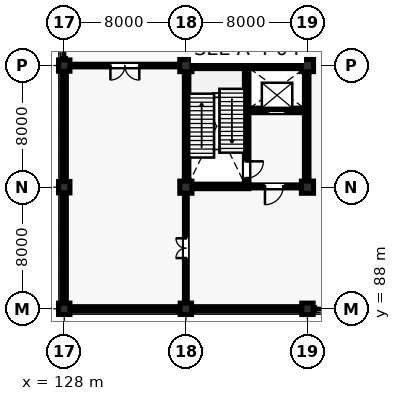
"""IFC4 building model, lengths in metres.
Left out: names, types, materials, properties, quantities, classifications, styles, units other than length and angle.
Written with IfcOpenShell. Run it as: python <this file> out.ifc"""

import sys

from ifc_helpers import new_model, si_unit, direction, frame, frame_2d, origin, origin_2d, place, context, subcontext, project, spatial, rectangle, extrude, element, fill, save


model = new_model("IFC4")
c1 = context("Model", 3, precision=1e-05, world=origin(), true_north=direction((0.0, 1.0)))
c2 = subcontext(c1, "Body", "Model", "MODEL_VIEW")
j1 = project(units=[si_unit("LENGTHUNIT", "METRE"), si_unit("PLANEANGLEUNIT", "RADIAN")], contexts=[c1])
p1 = place(None, origin())
s1 = spatial("IfcSite", under=j1, at=p1, CompositionType="ELEMENT")
p2 = place(p1, origin())
s2 = spatial("IfcBuilding", under=s1, at=p2, CompositionType="ELEMENT")
p3 = place(p2, origin())
s3 = spatial("IfcBuildingStorey", under=s2, at=p3, CompositionType="ELEMENT", Elevation=0.0)
for number, where, z_axis, x_axis in (
    (1, (128.0, 88.0, 0.0), (0.0, 0.0, 1.0), (1.0, 0.0, 0.0)),
    (2, (128.0, 96.0, 0.0), (0.0, 0.0, 1.0), (1.0, 0.0, 0.0)),
    (3, (128.0, 104.0, 0.0), (0.0, 0.0, 1.0), (1.0, 0.0, 0.0)),
    (4, (136.0, 88.0, 0.0), (0.0, 0.0, 1.0), (1.0, 0.0, 0.0)),
):
    element("IfcColumn", number, at=place(p3, frame(where, z_axis=z_axis, x_axis=x_axis)), inside=s3, PredefinedType="COLUMN", context=c2, shape_type="SweptSolid", body=[
        extrude(rectangle(XDim=0.75, YDim=0.75, at=origin_2d()), origin(), (0.0, 0.0, 1.0), 5.28),
    ])
for number, where, z_axis, x_axis in (
    (5, (136.0, 96.0, 0.0), (0.0, 0.0, 1.0), (1.0, 0.0, 0.0)),
    (6, (136.0, 104.0, 0.0), (0.0, 0.0, 1.0), (1.0, 0.0, 0.0)),
):
    element("IfcColumn", number, at=place(p3, frame(where, z_axis=z_axis, x_axis=x_axis)), inside=s3, PredefinedType="COLUMN", context=c2, shape_type="SweptSolid", body=[
        extrude(rectangle(XDim=0.8, YDim=0.8, at=origin_2d()), origin(), (0.0, 0.0, 1.0), 5.28),
    ])
p4 = place(p3, frame((144.0, 88.0, 0.0), z_axis=(0.0, 0.0, 1.0), x_axis=(1.0, 0.0, 0.0)))
e7 = element("IfcColumn", 7, at=p4, inside=s3, PredefinedType="COLUMN", context=c2, shape_type="SweptSolid", body=[
    extrude(rectangle(XDim=0.75, YDim=0.75, at=origin_2d()), origin(), (0.0, 0.0, 1.0), 5.28),
])
for number, where, z_axis, x_axis in (
    (8, (144.0, 96.0, 0.0), (0.0, 0.0, 1.0), (1.0, 0.0, 0.0)),
    (9, (144.0, 104.0, 0.0), (0.0, 0.0, 1.0), (1.0, 0.0, 0.0)),
):
    element("IfcColumn", number, at=place(p3, frame(where, z_axis=z_axis, x_axis=x_axis)), inside=s3, PredefinedType="COLUMN", context=c2, shape_type="SweptSolid", body=[
        extrude(rectangle(XDim=0.8, YDim=0.8, at=origin_2d()), origin(), (0.0, 0.0, 1.0), 5.28),
    ])
p5 = place(p3, frame((128.36, 88.0, 0.0), z_axis=(0.0, 0.0, 1.0), x_axis=(1.0, 0.0, 0.0)))
e10 = element("IfcWall", 10, at=p5, inside=s3, PredefinedType="SOLIDWALL", context=c2, shape_type="SweptSolid", body=[
    extrude(rectangle(XDim=7.28, YDim=0.28, at=frame_2d((3.64, 0.0))), origin(), (0.0, 0.0, 1.0), 4.677),
])
p6 = place(p5, frame((2.49, 0.0, 0.9)))
e11 = element("IfcOpeningElement", 11, at=p6, cuts=e10, PredefinedType="OPENING", context=c2, shape_type="SweptSolid", body=[
    extrude(rectangle(XDim=2.3, YDim=2.55, at=frame_2d((1.15, 1.275))), frame((0.0, 0.15, 0.0), z_axis=(0.0, -1.0, 0.0), x_axis=(1.0, 0.0, 0.0)), (0.0, 0.0, 1.0), 0.3),
])
p7 = place(p3, frame((128.0, 88.36, 0.0), z_axis=(0.0, 0.0, 1.0), x_axis=(0.0, 1.0, 0.0)))
e12 = element("IfcWall", 12, at=p7, inside=s3, PredefinedType="SOLIDWALL", context=c2, shape_type="SweptSolid", body=[
    extrude(rectangle(XDim=7.28, YDim=0.28, at=frame_2d((3.64, 0.0))), origin(), (0.0, 0.0, 1.0), 4.677),
])
p8 = place(p7, frame((2.49, 0.0, 0.9)))
e13 = element("IfcOpeningElement", 13, at=p8, cuts=e12, PredefinedType="OPENING", context=c2, shape_type="SweptSolid", body=[
    extrude(rectangle(XDim=2.3, YDim=2.55, at=frame_2d((1.15, 1.275))), frame((0.0, 0.15, 0.0), z_axis=(0.0, -1.0, 0.0), x_axis=(1.0, 0.0, 0.0)), (0.0, 0.0, 1.0), 0.3),
])
p9 = place(p3, frame((128.0, 96.36, 0.0), z_axis=(0.0, 0.0, 1.0), x_axis=(0.0, 1.0, 0.0)))
e14 = element("IfcWall", 14, at=p9, inside=s3, PredefinedType="SOLIDWALL", context=c2, shape_type="SweptSolid", body=[
    extrude(rectangle(XDim=7.28, YDim=0.28, at=frame_2d((3.64, 0.0))), origin(), (0.0, 0.0, 1.0), 4.61),
])
p10 = place(p9, frame((2.44, 0.0, 0.9)))
e15 = element("IfcOpeningElement", 15, at=p10, cuts=e14, PredefinedType="OPENING", context=c2, shape_type="SweptSolid", body=[
    extrude(rectangle(XDim=2.4, YDim=2.8, at=frame_2d((1.2, 1.4))), frame((0.0, 0.15, 0.0), z_axis=(0.0, -1.0, 0.0), x_axis=(1.0, 0.0, 0.0)), (0.0, 0.0, 1.0), 0.3),
])
p11 = place(p3, frame((136.36, 88.0, 0.0), z_axis=(0.0, 0.0, 1.0), x_axis=(1.0, 0.0, 0.0)))
e16 = element("IfcWall", 16, at=p11, inside=s3, PredefinedType="SOLIDWALL", context=c2, shape_type="SweptSolid", body=[
    extrude(rectangle(XDim=7.28, YDim=0.28, at=frame_2d((3.64, 0.0))), origin(), (0.0, 0.0, 1.0), 4.61),
])
p12 = place(p11, frame((2.44, 0.0, 0.9)))
e17 = element("IfcOpeningElement", 17, at=p12, cuts=e16, PredefinedType="OPENING", context=c2, shape_type="SweptSolid", body=[
    extrude(rectangle(XDim=2.4, YDim=2.8, at=frame_2d((1.2, 1.4))), frame((0.0, 0.15, 0.0), z_axis=(0.0, -1.0, 0.0), x_axis=(1.0, 0.0, 0.0)), (0.0, 0.0, 1.0), 0.3),
])
for number, where, z_axis, x_axis in (
    (18, (136.05, 96.29, 0.0), (0.0, 0.0, 1.0), (0.0, 1.0, 0.0)),
    (19, (136.29, 103.95, 0.0), (0.0, 0.0, 1.0), (1.0, 0.0, 0.0)),
    (20, (143.95, 96.29, 0.0), (0.0, 0.0, 1.0), (0.0, 1.0, 0.0)),
):
    element("IfcWall", number, at=place(p3, frame(where, z_axis=z_axis, x_axis=x_axis)), inside=s3, PredefinedType="SHEAR", context=c2, shape_type="SweptSolid", body=[
        extrude(rectangle(XDim=7.42, YDim=0.3, at=frame_2d((3.71, 0.0))), origin(), (0.0, 0.0, 1.0), 5.035),
    ])
p13 = place(p3, frame((136.29, 96.05, 0.0), z_axis=(0.0, 0.0, 1.0), x_axis=(1.0, 0.0, 0.0)))
e21 = element("IfcWall", 21, at=p13, inside=s3, PredefinedType="SHEAR", context=c2, shape_type="SweptSolid", body=[
    extrude(rectangle(XDim=3.86, YDim=0.3, at=frame_2d((1.93, 0.0))), origin(), (0.0, 0.0, 1.0), 5.035),
])
p14 = place(p3, frame((140.0, 96.05, 0.0), z_axis=(0.0, 0.0, 1.0), x_axis=(0.0, 1.0, 0.0)))
e22 = element("IfcWall", 22, at=p14, inside=s3, PredefinedType="SHEAR", context=c2, shape_type="SweptSolid", body=[
    extrude(rectangle(XDim=7.9, YDim=0.3, at=frame_2d((3.95, 0.0))), origin(), (0.0, 0.0, 1.0), 5.035),
])
p15 = place(p14, frame((0.55, 0.0, 0.0)))
e23 = element("IfcOpeningElement", 23, at=p15, cuts=e22, PredefinedType="OPENING", context=c2, shape_type="SweptSolid", body=[
    extrude(rectangle(XDim=1.1, YDim=2.15, at=frame_2d((0.55, 1.075))), frame((0.0, 0.16, 0.0), z_axis=(0.0, -1.0, 0.0), x_axis=(1.0, 0.0, 0.0)), (0.0, 0.0, 1.0), 0.32),
])
p16 = place(p3, frame((140.0, 101.05, 0.0), z_axis=(0.0, 0.0, 1.0), x_axis=(1.0, 0.0, 0.0)))
e24 = element("IfcWall", 24, at=p16, inside=s3, PredefinedType="SHEAR", context=c2, shape_type="SweptSolid", body=[
    extrude(rectangle(XDim=3.95, YDim=0.3, at=frame_2d((1.975, 0.0))), origin(), (0.0, 0.0, 1.0), 5.035),
])
p17 = place(p16, frame((1.425, 0.0, 0.0)))
e25 = element("IfcOpeningElement", 25, at=p17, cuts=e24, PredefinedType="OPENING", context=c2, shape_type="SweptSolid", body=[
    extrude(rectangle(XDim=1.1, YDim=2.2, at=frame_2d((0.55, 1.1))), frame((0.0, 0.16, 0.0), z_axis=(0.0, -1.0, 0.0), x_axis=(1.0, 0.0, 0.0)), (0.0, 0.0, 1.0), 0.32),
])
p18 = place(p3, frame((140.0, 96.05, 0.0), z_axis=(0.0, 0.0, 1.0), x_axis=(1.0, 0.0, 0.0)))
e26 = element("IfcWall", 26, at=p18, inside=s3, PredefinedType="PARTITIONING", context=c2, shape_type="SweptSolid", body=[
    extrude(rectangle(XDim=3.61, YDim=0.2, at=frame_2d((1.805, 0.0))), origin(), (0.0, 0.0, 1.0), 4.403),
])
p19 = place(p18, frame((1.205, 0.0, 0.0)))
e27 = element("IfcOpeningElement", 27, at=p19, cuts=e26, PredefinedType="OPENING", context=c2, shape_type="SweptSolid", body=[
    extrude(rectangle(XDim=1.2, YDim=2.15, at=frame_2d((0.6, 1.075))), frame((0.0, 0.11, 0.0), z_axis=(0.0, -1.0, 0.0), x_axis=(1.0, 0.0, 0.0)), (0.0, 0.0, 1.0), 0.22),
])
p20 = place(p3, frame((136.0, 88.365, 0.0), z_axis=(0.0, 0.0, 1.0), x_axis=(0.0, 1.0, 0.0)))
e28 = element("IfcWall", 28, at=p20, inside=s3, PredefinedType="PARTITIONING", context=c2, shape_type="SweptSolid", body=[
    extrude(rectangle(XDim=7.245, YDim=0.185, at=frame_2d((3.623, 0.0))), origin(), (0.0, 0.0, 1.0), 4.403),
])
p21 = place(p20, frame((2.972, 0.0, 0.0)))
e29 = element("IfcOpeningElement", 29, at=p21, cuts=e28, PredefinedType="OPENING", context=c2, shape_type="SweptSolid", body=[
    extrude(rectangle(XDim=1.3, YDim=2.2, at=frame_2d((0.65, 1.1))), frame((0.0, 0.103, 0.0), z_axis=(0.0, -1.0, 0.0), x_axis=(1.0, 0.0, 0.0)), (0.0, 0.0, 1.0), 0.205),
])
p22 = place(p3, frame((128.365, 104.0, 0.0), z_axis=(0.0, 0.0, 1.0), x_axis=(1.0, 0.0, 0.0)))
e30 = element("IfcWall", 30, at=p22, inside=s3, PredefinedType="PARTITIONING", context=c2, shape_type="SweptSolid", body=[
    extrude(rectangle(XDim=7.245, YDim=0.175, at=frame_2d((3.623, 0.0))), origin(), (0.0, 0.0, 1.0), 4.403),
])
p23 = place(p22, frame((2.673, 0.0, 0.0)))
e31 = element("IfcOpeningElement", 31, at=p23, cuts=e30, PredefinedType="OPENING", context=c2, shape_type="SweptSolid", body=[
    extrude(rectangle(XDim=1.9, YDim=2.38, at=frame_2d((0.95, 1.19))), frame((0.0, 0.097, 0.0), z_axis=(0.0, -1.0, 0.0), x_axis=(1.0, 0.0, 0.0)), (0.0, 0.0, 1.0), 0.195),
])
p24 = place(p6, origin())
e32 = element("IfcWindow", 32, at=p24, inside=s3, PartitioningType="SINGLE_PANEL", PredefinedType="WINDOW", context=c2, shape_type="SweptSolid", body=[
    extrude(rectangle(XDim=2.3, YDim=2.55, at=frame_2d((1.15, 1.275))), frame((0.0, 0.03, 0.0), z_axis=(0.0, -1.0, 0.0), x_axis=(1.0, 0.0, 0.0)), (0.0, 0.0, 1.0), 0.06),
])
fill(e11, e32)
p25 = place(p8, origin())
e33 = element("IfcWindow", 33, at=p25, inside=s3, PartitioningType="SINGLE_PANEL", PredefinedType="WINDOW", context=c2, shape_type="SweptSolid", body=[
    extrude(rectangle(XDim=2.3, YDim=2.55, at=frame_2d((1.15, 1.275))), frame((0.0, 0.03, 0.0), z_axis=(0.0, -1.0, 0.0), x_axis=(1.0, 0.0, 0.0)), (0.0, 0.0, 1.0), 0.06),
])
fill(e13, e33)
p26 = place(p10, origin())
e34 = element("IfcWindow", 34, at=p26, inside=s3, PartitioningType="SINGLE_PANEL", PredefinedType="WINDOW", context=c2, shape_type="SweptSolid", body=[
    extrude(rectangle(XDim=2.4, YDim=2.8, at=frame_2d((1.2, 1.4))), frame((0.0, 0.03, 0.0), z_axis=(0.0, -1.0, 0.0), x_axis=(1.0, 0.0, 0.0)), (0.0, 0.0, 1.0), 0.06),
])
fill(e15, e34)
p27 = place(p12, origin())
e35 = element("IfcWindow", 35, at=p27, inside=s3, PartitioningType="SINGLE_PANEL", PredefinedType="WINDOW", context=c2, shape_type="SweptSolid", body=[
    extrude(rectangle(XDim=2.4, YDim=2.8, at=frame_2d((1.2, 1.4))), frame((0.0, 0.03, 0.0), z_axis=(0.0, -1.0, 0.0), x_axis=(1.0, 0.0, 0.0)), (0.0, 0.0, 1.0), 0.06),
])
fill(e17, e35)
p28 = place(p15, frame((1.1, 0.0, 0.0), z_axis=(0.0, 0.0, 1.0), x_axis=(-1.0, 0.0, 0.0)))
e36 = element("IfcDoor", 36, at=p28, inside=s3, OperationType="SINGLE_SWING_RIGHT", PredefinedType="DOOR", context=c2, shape_type="SweptSolid", body=[
    extrude(rectangle(XDim=1.1, YDim=2.15, at=frame_2d((0.55, 1.075))), frame((0.0, 0.025, 0.0), z_axis=(0.0, -1.0, 0.0), x_axis=(1.0, 0.0, 0.0)), (0.0, 0.0, 1.0), 0.05),
])
fill(e23, e36)
p29 = place(p17, origin())
e37 = element("IfcDoor", 37, at=p29, inside=s3, OperationType="SLIDING_TO_LEFT", PredefinedType="DOOR", context=c2, shape_type="SweptSolid", body=[
    extrude(rectangle(XDim=1.1, YDim=2.2, at=frame_2d((0.55, 1.1))), frame((0.0, 0.025, 0.0), z_axis=(0.0, -1.0, 0.0), x_axis=(1.0, 0.0, 0.0)), (0.0, 0.0, 1.0), 0.05),
])
fill(e25, e37)
p30 = place(p19, frame((1.2, 0.0, 0.0), z_axis=(0.0, 0.0, 1.0), x_axis=(-1.0, 0.0, 0.0)))
e38 = element("IfcDoor", 38, at=p30, inside=s3, OperationType="SINGLE_SWING_LEFT", PredefinedType="DOOR", context=c2, shape_type="SweptSolid", body=[
    extrude(rectangle(XDim=1.2, YDim=2.15, at=frame_2d((0.6, 1.075))), frame((0.0, 0.025, 0.0), z_axis=(0.0, -1.0, 0.0), x_axis=(1.0, 0.0, 0.0)), (0.0, 0.0, 1.0), 0.05),
])
fill(e27, e38)
p31 = place(p21, origin())
e39 = element("IfcDoor", 39, at=p31, inside=s3, OperationType="DOUBLE_DOOR_SINGLE_SWING", PredefinedType="DOOR", context=c2, shape_type="SweptSolid", body=[
    extrude(rectangle(XDim=1.3, YDim=2.2, at=frame_2d((0.65, 1.1))), frame((0.0, 0.025, 0.0), z_axis=(0.0, -1.0, 0.0), x_axis=(1.0, 0.0, 0.0)), (0.0, 0.0, 1.0), 0.05),
])
fill(e29, e39)
p32 = place(p23, frame((1.9, 0.0, 0.0), z_axis=(0.0, 0.0, 1.0), x_axis=(-1.0, 0.0, 0.0)))
e40 = element("IfcDoor", 40, at=p32, inside=s3, OperationType="DOUBLE_DOOR_SINGLE_SWING", PredefinedType="DOOR", context=c2, shape_type="SweptSolid", body=[
    extrude(rectangle(XDim=1.9, YDim=2.38, at=frame_2d((0.95, 1.19))), frame((0.0, 0.025, 0.0), z_axis=(0.0, -1.0, 0.0), x_axis=(1.0, 0.0, 0.0)), (0.0, 0.0, 1.0), 0.05),
])
fill(e31, e40)
save(model, sys.argv[1])
